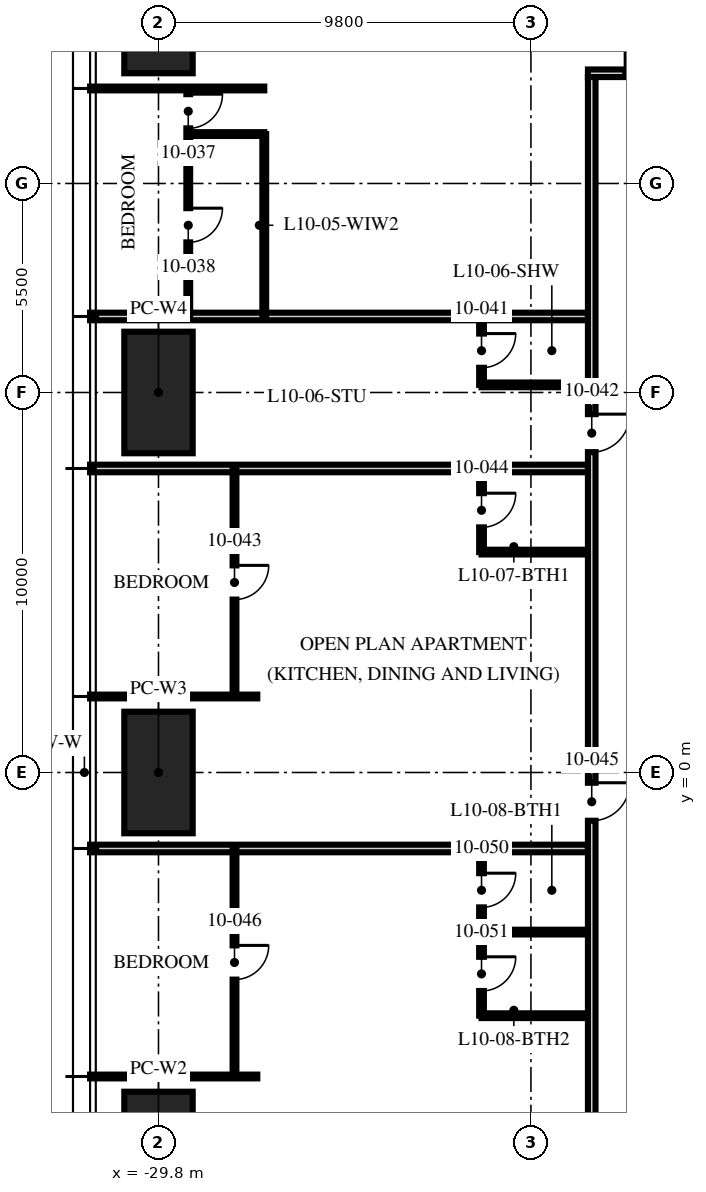
"""IFC4 building model, lengths in metres.
Left out: names, types, materials, properties, quantities, classifications, styles, units other than length and angle.
Written with IfcOpenShell. Run it as: python <this file> out.ifc"""

import sys

from ifc_helpers import new_model, si_unit, direction, frame, frame_2d, origin, origin_2d, place, context, subcontext, project, spatial, rectangle, hollow_rectangle, extrude, element, fill, save


model = new_model("IFC4")
c1 = context("Model", 3, precision=1e-05, world=origin(), true_north=direction((0.0, 1.0)))
c2 = subcontext(c1, "Body", "Model", "MODEL_VIEW")
j1 = project(units=[si_unit("LENGTHUNIT", "METRE"), si_unit("PLANEANGLEUNIT", "RADIAN")], contexts=[c1])
p1 = place(None, origin())
s1 = spatial("IfcSite", under=j1, at=p1, CompositionType="ELEMENT")
p2 = place(p1, origin())
s2 = spatial("IfcBuilding", under=s1, at=p2, CompositionType="ELEMENT")
p3 = place(p2, frame((0.0, 0.0, 43.5)))
s3 = spatial("IfcBuildingStorey", under=s2, at=p3, CompositionType="ELEMENT", Elevation=43.5)
for number, where, z_axis, x_axis in (
    (1, (-29.8, -10.0, 0.0), (0.0, 0.0, 1.0), (0.0, 1.0, 0.0)),
    (2, (-29.8, 0.0, 0.0), (0.0, 0.0, 1.0), (0.0, 1.0, 0.0)),
    (3, (-29.8, 10.0, 0.0), (0.0, 0.0, 1.0), (0.0, 1.0, 0.0)),
    (4, (-29.8, 20.0, 0.0), (0.0, 0.0, 1.0), (0.0, 1.0, 0.0)),
):
    element("IfcColumn", number, at=place(p3, frame(where, z_axis=z_axis, x_axis=x_axis)), inside=s3, PredefinedType="COLUMN", context=c2, shape_type="SweptSolid", body=[
        extrude(hollow_rectangle(XDim=3.2, YDim=1.8, WallThickness=0.2, at=origin_2d()), origin(), (0.0, 0.0, 1.0), 3.75),
    ])
p4 = place(p3, frame((-27.017, 18.0, 0.0), z_axis=(0.0, 0.0, 1.0), x_axis=(-1.0, 0.0, 0.0)))
e5 = element("IfcWall", 5, at=p4, inside=s3, PredefinedType="PARTITIONING", context=c2, shape_type="SweptSolid", body=[
    extrude(rectangle(XDim=4.583, YDim=0.1, at=frame_2d((2.292, 0.0))), origin(), (0.0, 0.0, 1.0), 2.71),
])
for number, where, z_axis, x_axis in (
    (6, (-18.5, 12.0, 0.0), (0.0, 0.0, 1.0), (-1.0, 0.0, 0.0)),
    (7, (-18.5, 8.0, 0.0), (0.0, 0.0, 1.0), (-1.0, 0.0, 0.0)),
):
    element("IfcWall", number, at=place(p3, frame(where, z_axis=z_axis, x_axis=x_axis)), inside=s3, PredefinedType="PARTITIONING", context=c2, shape_type="SweptSolid", body=[
        extrude(rectangle(XDim=13.1, YDim=0.2, at=frame_2d((6.55, 0.0))), origin(), (0.0, 0.0, 1.0), 2.71),
    ])
p5 = place(p3, frame((-27.2, 2.0, 0.0), z_axis=(0.0, 0.0, 1.0), x_axis=(-1.0, 0.0, 0.0)))
e8 = element("IfcWall", 8, at=p5, inside=s3, PredefinedType="PARTITIONING", context=c2, shape_type="SweptSolid", body=[
    extrude(rectangle(XDim=4.4, YDim=0.1, at=frame_2d((2.2, 0.0))), origin(), (0.0, 0.0, 1.0), 2.71),
])
p6 = place(p3, frame((-18.5, -2.0, 0.0), z_axis=(0.0, 0.0, 1.0), x_axis=(-1.0, 0.0, 0.0)))
e9 = element("IfcWall", 9, at=p6, inside=s3, PredefinedType="PARTITIONING", context=c2, shape_type="SweptSolid", body=[
    extrude(rectangle(XDim=13.1, YDim=0.2, at=frame_2d((6.55, 0.0))), origin(), (0.0, 0.0, 1.0), 2.71),
])
p7 = place(p3, frame((-27.2, -8.0, 0.0), z_axis=(0.0, 0.0, 1.0), x_axis=(-1.0, 0.0, 0.0)))
e10 = element("IfcWall", 10, at=p7, inside=s3, PredefinedType="PARTITIONING", context=c2, shape_type="SweptSolid", body=[
    extrude(rectangle(XDim=4.4, YDim=0.1, at=frame_2d((2.2, 0.0))), origin(), (0.0, 0.0, 1.0), 2.71),
])
p8 = place(p3, frame((-29.017, 18.0, 0.0), z_axis=(0.0, 0.0, 1.0), x_axis=(0.0, -1.0, 0.0)))
e11 = element("IfcWall", 11, at=p8, inside=s3, PredefinedType="PARTITIONING", context=c2, shape_type="SweptSolid", body=[
    extrude(rectangle(XDim=6.0, YDim=0.1, at=frame_2d((3.0, 0.0))), origin(), (0.0, 0.0, 1.0), 2.61),
])
p9 = place(p8, frame((0.15, 0.0, 0.0)))
e12 = element("IfcOpeningElement", 12, at=p9, cuts=e11, PredefinedType="OPENING", context=c2, shape_type="SweptSolid", body=[
    extrude(rectangle(XDim=0.9, YDim=2.1, at=frame_2d((0.45, 1.05))), frame((0.0, 0.06, 0.0), z_axis=(0.0, -1.0, 0.0), x_axis=(1.0, 0.0, 0.0)), (0.0, 0.0, 1.0), 0.12),
])
p10 = place(p8, frame((3.15, 0.0, 0.0)))
e13 = element("IfcOpeningElement", 13, at=p10, cuts=e11, PredefinedType="OPENING", context=c2, shape_type="SweptSolid", body=[
    extrude(rectangle(XDim=0.9, YDim=2.1, at=frame_2d((0.45, 1.05))), frame((0.0, 0.06, 0.0), z_axis=(0.0, -1.0, 0.0), x_axis=(1.0, 0.0, 0.0)), (0.0, 0.0, 1.0), 0.12),
])
p11 = place(p3, frame((-27.017, 16.8, 0.0), z_axis=(0.0, 0.0, 1.0), x_axis=(-1.0, 0.0, 0.0)))
e14 = element("IfcWall", 14, at=p11, inside=s3, PredefinedType="PARTITIONING", context=c2, shape_type="SweptSolid", body=[
    extrude(rectangle(XDim=2.0, YDim=0.1, at=frame_2d((1.0, 0.0))), origin(), (0.0, 0.0, 1.0), 3.5),
])
p12 = place(p3, frame((-27.017, 16.8, 0.0), z_axis=(0.0, 0.0, 1.0), x_axis=(0.0, -1.0, 0.0)))
e15 = element("IfcWall", 15, at=p12, inside=s3, PredefinedType="PARTITIONING", context=c2, shape_type="SweptSolid", body=[
    extrude(rectangle(XDim=4.8, YDim=0.1, at=frame_2d((2.4, 0.0))), origin(), (0.0, 0.0, 1.0), 2.61),
])
p13 = place(p3, frame((-21.3, 12.0, 0.0), z_axis=(0.0, 0.0, 1.0), x_axis=(0.0, -1.0, 0.0)))
e16 = element("IfcWall", 16, at=p13, inside=s3, PredefinedType="PARTITIONING", context=c2, shape_type="SweptSolid", body=[
    extrude(rectangle(XDim=1.8, YDim=0.125, at=frame_2d((0.9, 0.0))), origin(), (0.0, 0.0, 1.0), 3.5),
])
p14 = place(p13, frame((0.45, 0.0, 0.0)))
e17 = element("IfcOpeningElement", 17, at=p14, cuts=e16, PredefinedType="OPENING", context=c2, shape_type="SweptSolid", body=[
    extrude(rectangle(XDim=0.9, YDim=2.1, at=frame_2d((0.45, 1.05))), frame((0.0, 0.073, 0.0), z_axis=(0.0, -1.0, 0.0), x_axis=(1.0, 0.0, 0.0)), (0.0, 0.0, 1.0), 0.145),
])
p15 = place(p3, frame((-18.5, 10.2, 0.0), z_axis=(0.0, 0.0, 1.0), x_axis=(-1.0, 0.0, 0.0)))
e18 = element("IfcWall", 18, at=p15, inside=s3, PredefinedType="PARTITIONING", context=c2, shape_type="SweptSolid", body=[
    extrude(rectangle(XDim=2.8, YDim=0.125, at=frame_2d((1.4, 0.0))), origin(), (0.0, 0.0, 1.0), 2.492),
])
p16 = place(p3, frame((-27.8, 8.0, 0.0), z_axis=(0.0, 0.0, 1.0), x_axis=(0.0, -1.0, 0.0)))
e19 = element("IfcWall", 19, at=p16, inside=s3, PredefinedType="PARTITIONING", context=c2, shape_type="SweptSolid", body=[
    extrude(rectangle(XDim=6.0, YDim=0.1, at=frame_2d((3.0, 0.0))), origin(), (0.0, 0.0, 1.0), 2.61),
])
p17 = place(p16, frame((2.55, 0.0, 0.0)))
e20 = element("IfcOpeningElement", 20, at=p17, cuts=e19, PredefinedType="OPENING", context=c2, shape_type="SweptSolid", body=[
    extrude(rectangle(XDim=0.9, YDim=2.1, at=frame_2d((0.45, 1.05))), frame((0.0, 0.06, 0.0), z_axis=(0.0, -1.0, 0.0), x_axis=(1.0, 0.0, 0.0)), (0.0, 0.0, 1.0), 0.12),
])
p18 = place(p3, frame((-21.3, 8.0, 0.0), z_axis=(0.0, 0.0, 1.0), x_axis=(0.0, -1.0, 0.0)))
e21 = element("IfcWall", 21, at=p18, inside=s3, PredefinedType="PARTITIONING", context=c2, shape_type="SweptSolid", body=[
    extrude(rectangle(XDim=2.2, YDim=0.125, at=frame_2d((1.1, 0.0))), origin(), (0.0, 0.0, 1.0), 3.5),
])
p19 = place(p18, frame((0.65, 0.0, 0.0)))
e22 = element("IfcOpeningElement", 22, at=p19, cuts=e21, PredefinedType="OPENING", context=c2, shape_type="SweptSolid", body=[
    extrude(rectangle(XDim=0.9, YDim=2.1, at=frame_2d((0.45, 1.05))), frame((0.0, 0.073, 0.0), z_axis=(0.0, -1.0, 0.0), x_axis=(1.0, 0.0, 0.0)), (0.0, 0.0, 1.0), 0.145),
])
p20 = place(p3, frame((-18.5, 5.8, 0.0), z_axis=(0.0, 0.0, 1.0), x_axis=(-1.0, 0.0, 0.0)))
e23 = element("IfcWall", 23, at=p20, inside=s3, PredefinedType="PARTITIONING", context=c2, shape_type="SweptSolid", body=[
    extrude(rectangle(XDim=2.8, YDim=0.125, at=frame_2d((1.4, 0.0))), origin(), (0.0, 0.0, 1.0), 3.5),
])
p21 = place(p3, frame((-27.8, -2.0, 0.0), z_axis=(0.0, 0.0, 1.0), x_axis=(0.0, -1.0, 0.0)))
e24 = element("IfcWall", 24, at=p21, inside=s3, PredefinedType="PARTITIONING", context=c2, shape_type="SweptSolid", body=[
    extrude(rectangle(XDim=6.0, YDim=0.1, at=frame_2d((3.0, 0.0))), origin(), (0.0, 0.0, 1.0), 2.61),
])
p22 = place(p21, frame((2.55, 0.0, 0.0)))
e25 = element("IfcOpeningElement", 25, at=p22, cuts=e24, PredefinedType="OPENING", context=c2, shape_type="SweptSolid", body=[
    extrude(rectangle(XDim=0.9, YDim=2.1, at=frame_2d((0.45, 1.05))), frame((0.0, 0.06, 0.0), z_axis=(0.0, -1.0, 0.0), x_axis=(1.0, 0.0, 0.0)), (0.0, 0.0, 1.0), 0.12),
])
p23 = place(p3, frame((-21.3, -2.0, 0.0), z_axis=(0.0, 0.0, 1.0), x_axis=(0.0, -1.0, 0.0)))
e26 = element("IfcWall", 26, at=p23, inside=s3, PredefinedType="PARTITIONING", context=c2, shape_type="SweptSolid", body=[
    extrude(rectangle(XDim=4.4, YDim=0.125, at=frame_2d((2.2, 0.0))), origin(), (0.0, 0.0, 1.0), 2.61),
])
p24 = place(p23, frame((0.65, 0.0, 0.0)))
e27 = element("IfcOpeningElement", 27, at=p24, cuts=e26, PredefinedType="OPENING", context=c2, shape_type="SweptSolid", body=[
    extrude(rectangle(XDim=0.9, YDim=2.1, at=frame_2d((0.45, 1.05))), frame((0.0, 0.073, 0.0), z_axis=(0.0, -1.0, 0.0), x_axis=(1.0, 0.0, 0.0)), (0.0, 0.0, 1.0), 0.145),
])
p25 = place(p23, frame((2.85, 0.0, 0.0)))
e28 = element("IfcOpeningElement", 28, at=p25, cuts=e26, PredefinedType="OPENING", context=c2, shape_type="SweptSolid", body=[
    extrude(rectangle(XDim=0.9, YDim=2.1, at=frame_2d((0.45, 1.05))), frame((0.0, 0.073, 0.0), z_axis=(0.0, -1.0, 0.0), x_axis=(1.0, 0.0, 0.0)), (0.0, 0.0, 1.0), 0.145),
])
for number, where, z_axis, x_axis in (
    (29, (-18.5, -4.2, 0.0), (0.0, 0.0, 1.0), (-1.0, 0.0, 0.0)),
    (30, (-18.5, -6.4, 0.0), (0.0, 0.0, 1.0), (-1.0, 0.0, 0.0)),
):
    element("IfcWall", number, at=place(p3, frame(where, z_axis=z_axis, x_axis=x_axis)), inside=s3, PredefinedType="PARTITIONING", context=c2, shape_type="SweptSolid", body=[
        extrude(rectangle(XDim=2.8, YDim=0.125, at=frame_2d((1.4, 0.0))), origin(), (0.0, 0.0, 1.0), 3.5),
    ])
p26 = place(p3, frame((-18.5, 18.4, 0.0), z_axis=(0.0, 0.0, 1.0), x_axis=(1.0, 0.0, 0.0)))
e31 = element("IfcWall", 31, at=p26, inside=s3, PredefinedType="PARTITIONING", context=c2, shape_type="SweptSolid", body=[
    extrude(rectangle(XDim=18.5, YDim=0.2, at=frame_2d((9.25, 0.0))), origin(), (0.0, 0.0, 1.0), 2.3),
])
p27 = place(p26, frame((0.98, 0.0, 0.0)))
e32 = element("IfcOpeningElement", 32, at=p27, cuts=e31, PredefinedType="OPENING", context=c2, shape_type="SweptSolid", body=[
    extrude(rectangle(XDim=1.0, YDim=2.2, at=frame_2d((0.5, 1.1))), frame((0.0, 0.11, 0.0), z_axis=(0.0, -1.0, 0.0), x_axis=(1.0, 0.0, 0.0)), (0.0, 0.0, 1.0), 0.22),
])
p28 = place(p3, frame((-18.4, 18.3, 0.0), z_axis=(0.0, 0.0, 1.0), x_axis=(0.0, -1.0, 0.0)))
e33 = element("IfcWall", 33, at=p28, inside=s3, PredefinedType="PARTITIONING", context=c2, shape_type="SweptSolid", body=[
    extrude(rectangle(XDim=36.6, YDim=0.2, at=frame_2d((18.3, 0.0))), origin(), (0.0, 0.0, 1.0), 2.3),
])
p29 = place(p28, frame((8.87, 0.0, 0.0)))
e34 = element("IfcOpeningElement", 34, at=p29, cuts=e33, PredefinedType="OPENING", context=c2, shape_type="SweptSolid", body=[
    extrude(rectangle(XDim=1.0, YDim=2.2, at=frame_2d((0.5, 1.1))), frame((0.0, 0.11, 0.0), z_axis=(0.0, -1.0, 0.0), x_axis=(1.0, 0.0, 0.0)), (0.0, 0.0, 1.0), 0.22),
])
p30 = place(p28, frame((18.57, 0.0, 0.0)))
e35 = element("IfcOpeningElement", 35, at=p30, cuts=e33, PredefinedType="OPENING", context=c2, shape_type="SweptSolid", body=[
    extrude(rectangle(XDim=1.0, YDim=2.2, at=frame_2d((0.5, 1.1))), frame((0.0, 0.11, 0.0), z_axis=(0.0, -1.0, 0.0), x_axis=(1.0, 0.0, 0.0)), (0.0, 0.0, 1.0), 0.22),
])
p31 = place(p9, origin())
e36 = element("IfcDoor", 36, at=p31, inside=s3, OperationType="SINGLE_SWING_LEFT", PredefinedType="DOOR", context=c2, shape_type="SweptSolid", body=[
    extrude(rectangle(XDim=0.9, YDim=2.1, at=frame_2d((0.45, 1.05))), frame((0.0, 0.025, 0.0), z_axis=(0.0, -1.0, 0.0), x_axis=(1.0, 0.0, 0.0)), (0.0, 0.0, 1.0), 0.05),
])
fill(e12, e36)
p32 = place(p10, origin())
e37 = element("IfcDoor", 37, at=p32, inside=s3, OperationType="SINGLE_SWING_LEFT", PredefinedType="DOOR", context=c2, shape_type="SweptSolid", body=[
    extrude(rectangle(XDim=0.9, YDim=2.1, at=frame_2d((0.45, 1.05))), frame((0.0, 0.025, 0.0), z_axis=(0.0, -1.0, 0.0), x_axis=(1.0, 0.0, 0.0)), (0.0, 0.0, 1.0), 0.05),
])
fill(e13, e37)
p33 = place(p27, origin())
e38 = element("IfcDoor", 38, at=p33, inside=s3, OperationType="SINGLE_SWING_LEFT", PredefinedType="DOOR", context=c2, shape_type="SweptSolid", body=[
    extrude(rectangle(XDim=1.0, YDim=2.2, at=frame_2d((0.5, 1.1))), frame((0.0, 0.025, 0.0), z_axis=(0.0, -1.0, 0.0), x_axis=(1.0, 0.0, 0.0)), (0.0, 0.0, 1.0), 0.05),
])
fill(e32, e38)
p34 = place(p14, origin())
e39 = element("IfcDoor", 39, at=p34, inside=s3, OperationType="SINGLE_SWING_LEFT", PredefinedType="DOOR", context=c2, shape_type="SweptSolid", body=[
    extrude(rectangle(XDim=0.9, YDim=2.1, at=frame_2d((0.45, 1.05))), frame((0.0, 0.025, 0.0), z_axis=(0.0, -1.0, 0.0), x_axis=(1.0, 0.0, 0.0)), (0.0, 0.0, 1.0), 0.05),
])
fill(e17, e39)
p35 = place(p29, origin())
e40 = element("IfcDoor", 40, at=p35, inside=s3, OperationType="SINGLE_SWING_LEFT", PredefinedType="DOOR", context=c2, shape_type="SweptSolid", body=[
    extrude(rectangle(XDim=1.0, YDim=2.2, at=frame_2d((0.5, 1.1))), frame((0.0, 0.025, 0.0), z_axis=(0.0, -1.0, 0.0), x_axis=(1.0, 0.0, 0.0)), (0.0, 0.0, 1.0), 0.05),
])
fill(e34, e40)
p36 = place(p17, origin())
e41 = element("IfcDoor", 41, at=p36, inside=s3, OperationType="SINGLE_SWING_LEFT", PredefinedType="DOOR", context=c2, shape_type="SweptSolid", body=[
    extrude(rectangle(XDim=0.9, YDim=2.1, at=frame_2d((0.45, 1.05))), frame((0.0, 0.025, 0.0), z_axis=(0.0, -1.0, 0.0), x_axis=(1.0, 0.0, 0.0)), (0.0, 0.0, 1.0), 0.05),
])
fill(e20, e41)
p37 = place(p19, origin())
e42 = element("IfcDoor", 42, at=p37, inside=s3, OperationType="SINGLE_SWING_LEFT", PredefinedType="DOOR", context=c2, shape_type="SweptSolid", body=[
    extrude(rectangle(XDim=0.9, YDim=2.1, at=frame_2d((0.45, 1.05))), frame((0.0, 0.025, 0.0), z_axis=(0.0, -1.0, 0.0), x_axis=(1.0, 0.0, 0.0)), (0.0, 0.0, 1.0), 0.05),
])
fill(e22, e42)
p38 = place(p30, origin())
e43 = element("IfcDoor", 43, at=p38, inside=s3, OperationType="SINGLE_SWING_LEFT", PredefinedType="DOOR", context=c2, shape_type="SweptSolid", body=[
    extrude(rectangle(XDim=1.0, YDim=2.2, at=frame_2d((0.5, 1.1))), frame((0.0, 0.025, 0.0), z_axis=(0.0, -1.0, 0.0), x_axis=(1.0, 0.0, 0.0)), (0.0, 0.0, 1.0), 0.05),
])
fill(e35, e43)
p39 = place(p22, origin())
e44 = element("IfcDoor", 44, at=p39, inside=s3, OperationType="SINGLE_SWING_LEFT", PredefinedType="DOOR", context=c2, shape_type="SweptSolid", body=[
    extrude(rectangle(XDim=0.9, YDim=2.1, at=frame_2d((0.45, 1.05))), frame((0.0, 0.025, 0.0), z_axis=(0.0, -1.0, 0.0), x_axis=(1.0, 0.0, 0.0)), (0.0, 0.0, 1.0), 0.05),
])
fill(e25, e44)
p40 = place(p24, origin())
e45 = element("IfcDoor", 45, at=p40, inside=s3, OperationType="SINGLE_SWING_LEFT", PredefinedType="DOOR", context=c2, shape_type="SweptSolid", body=[
    extrude(rectangle(XDim=0.9, YDim=2.1, at=frame_2d((0.45, 1.05))), frame((0.0, 0.025, 0.0), z_axis=(0.0, -1.0, 0.0), x_axis=(1.0, 0.0, 0.0)), (0.0, 0.0, 1.0), 0.05),
])
fill(e27, e45)
p41 = place(p25, origin())
e46 = element("IfcDoor", 46, at=p41, inside=s3, OperationType="SINGLE_SWING_LEFT", PredefinedType="DOOR", context=c2, shape_type="SweptSolid", body=[
    extrude(rectangle(XDim=0.9, YDim=2.1, at=frame_2d((0.45, 1.05))), frame((0.0, 0.025, 0.0), z_axis=(0.0, -1.0, 0.0), x_axis=(1.0, 0.0, 0.0)), (0.0, 0.0, 1.0), 0.05),
])
fill(e28, e46)
save(model, sys.argv[1])
